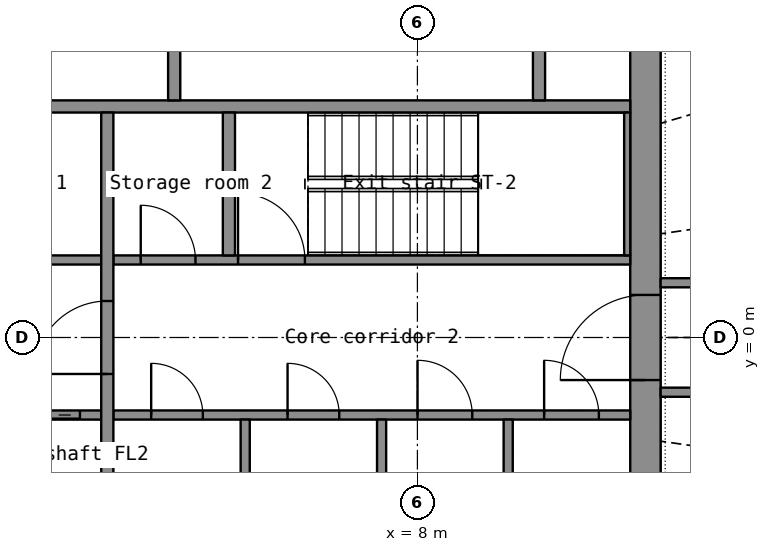
"""IFC4 building model, lengths in metres.
Left out: names, types, materials, properties, quantities, classifications, styles, units other than length and angle.
Written with IfcOpenShell. Run it as: python <this file> out.ifc"""

import sys

from ifc_helpers import new_model, si_unit, direction, frame, frame_2d, origin, place, context, subcontext, project, spatial, rectangle, extrude, element, fill, save


model = new_model("IFC4")
c1 = context("Model", 3, precision=1e-05, world=origin(), true_north=direction((0.0, 1.0)))
c2 = subcontext(c1, "Body", "Model", "MODEL_VIEW")
j1 = project(units=[si_unit("LENGTHUNIT", "METRE"), si_unit("PLANEANGLEUNIT", "RADIAN")], contexts=[c1])
p1 = place(None, origin())
s1 = spatial("IfcSite", under=j1, at=p1, CompositionType="ELEMENT")
p2 = place(p1, origin())
s2 = spatial("IfcBuilding", under=s1, at=p2, CompositionType="ELEMENT")
p3 = place(p2, frame((0.0, 0.0, 123.0)))
s3 = spatial("IfcBuildingStorey", under=s2, at=p3, CompositionType="ELEMENT", Elevation=123.0)
p4 = place(p3, frame((11.75, -7.2, 0.0), z_axis=(0.0, 0.0, 1.0), x_axis=(0.0, 1.0, 0.0)))
e1 = element("IfcWall", 1, at=p4, inside=s3, PredefinedType="SHEAR", context=c2, shape_type="SweptSolid", body=[
    extrude(rectangle(XDim=14.4, YDim=0.5, at=frame_2d((7.2, 0.0))), origin(), (0.0, 0.0, 1.0), 3.3),
])
p5 = place(p4, frame((6.5, 0.0, 0.0)))
e2 = element("IfcOpeningElement", 2, at=p5, cuts=e1, PredefinedType="OPENING", context=c2, shape_type="SweptSolid", body=[
    extrude(rectangle(XDim=1.4, YDim=2.2, at=frame_2d((0.7, 1.1))), frame((0.0, 0.26, 0.0), z_axis=(0.0, -1.0, 0.0), x_axis=(1.0, 0.0, 0.0)), (0.0, 0.0, 1.0), 0.52),
])
p6 = place(p3, frame((-11.5, 3.8, 0.0), z_axis=(0.0, 0.0, 1.0), x_axis=(1.0, 0.0, 0.0)))
e3 = element("IfcWall", 3, at=p6, inside=s3, PredefinedType="SHEAR", context=c2, shape_type="SweptSolid", body=[
    extrude(rectangle(XDim=23.0, YDim=0.2, at=frame_2d((11.5, 0.0))), origin(), (0.0, 0.0, 1.0), 3.3),
])
p7 = place(p3, frame((10.0, 3.9, 0.0), z_axis=(0.0, 0.0, 1.0), x_axis=(0.0, 1.0, 0.0)))
e4 = element("IfcWall", 4, at=p7, inside=s3, PredefinedType="SHEAR", context=c2, shape_type="SweptSolid", body=[
    extrude(rectangle(XDim=2.8, YDim=0.2, at=frame_2d((1.4, 0.0))), origin(), (0.0, 0.0, 1.0), 3.3),
])
p8 = place(p3, frame((4.0, 3.9, 0.0), z_axis=(0.0, 0.0, 1.0), x_axis=(0.0, 1.0, 0.0)))
e5 = element("IfcWall", 5, at=p8, inside=s3, PredefinedType="PARTITIONING", context=c2, shape_type="SweptSolid", body=[
    extrude(rectangle(XDim=2.8, YDim=0.2, at=frame_2d((1.4, 0.0))), origin(), (0.0, 0.0, 1.0), 3.3),
])
p9 = place(p3, frame((-2.8, -1.275, 0.0), z_axis=(0.0, 0.0, 1.0), x_axis=(1.0, 0.0, 0.0)))
e6 = element("IfcWall", 6, at=p9, inside=s3, PredefinedType="SHEAR", context=c2, shape_type="SweptSolid", body=[
    extrude(rectangle(XDim=5.6, YDim=0.15, at=frame_2d((2.8, 0.0))), origin(), (0.0, 0.0, 1.0), 3.3),
])
p10 = place(p9, frame((4.15, 0.0, 0.0)))
e7 = element("IfcOpeningElement", 7, at=p10, cuts=e6, PredefinedType="OPENING", context=c2, shape_type="SweptSolid", body=[
    extrude(rectangle(XDim=1.1, YDim=2.2, at=frame_2d((0.55, 1.1))), frame((0.0, 0.085, 0.0), z_axis=(0.0, -1.0, 0.0), x_axis=(1.0, 0.0, 0.0)), (0.0, 0.0, 1.0), 0.17),
])
p11 = place(p9, frame((1.35, 0.0, 0.0)))
e8 = element("IfcOpeningElement", 8, at=p11, cuts=e6, PredefinedType="OPENING", context=c2, shape_type="SweptSolid", body=[
    extrude(rectangle(XDim=0.9, YDim=2.1, at=frame_2d((0.45, 1.05))), frame((0.0, 0.085, 0.0), z_axis=(0.0, -1.0, 0.0), x_axis=(1.0, 0.0, 0.0)), (0.0, 0.0, 1.0), 0.17),
])
p12 = place(p3, frame((3.0, -1.275, 0.0), z_axis=(0.0, 0.0, 1.0), x_axis=(1.0, 0.0, 0.0)))
e9 = element("IfcWall", 9, at=p12, inside=s3, PredefinedType="PARTITIONING", context=c2, shape_type="SweptSolid", body=[
    extrude(rectangle(XDim=8.5, YDim=0.15, at=frame_2d((4.25, 0.0))), origin(), (0.0, 0.0, 1.0), 3.3),
])
p13 = place(p12, frame((0.622, 0.0, 0.0)))
e10 = element("IfcOpeningElement", 10, at=p13, cuts=e9, PredefinedType="OPENING", context=c2, shape_type="SweptSolid", body=[
    extrude(rectangle(XDim=0.85, YDim=2.1, at=frame_2d((0.425, 1.05))), frame((0.0, 0.085, 0.0), z_axis=(0.0, -1.0, 0.0), x_axis=(1.0, 0.0, 0.0)), (0.0, 0.0, 1.0), 0.17),
])
p14 = place(p12, frame((2.865, 0.0, 0.0)))
e11 = element("IfcOpeningElement", 11, at=p14, cuts=e9, PredefinedType="OPENING", context=c2, shape_type="SweptSolid", body=[
    extrude(rectangle(XDim=0.85, YDim=2.1, at=frame_2d((0.425, 1.05))), frame((0.0, 0.085, 0.0), z_axis=(0.0, -1.0, 0.0), x_axis=(1.0, 0.0, 0.0)), (0.0, 0.0, 1.0), 0.17),
])
p15 = place(p12, frame((5.002, 0.0, 0.0)))
e12 = element("IfcOpeningElement", 12, at=p15, cuts=e9, PredefinedType="OPENING", context=c2, shape_type="SweptSolid", body=[
    extrude(rectangle(XDim=0.9, YDim=2.1, at=frame_2d((0.45, 1.05))), frame((0.0, 0.085, 0.0), z_axis=(0.0, -1.0, 0.0), x_axis=(1.0, 0.0, 0.0)), (0.0, 0.0, 1.0), 0.17),
])
p16 = place(p12, frame((7.084, 0.0, 0.0)))
e13 = element("IfcOpeningElement", 13, at=p16, cuts=e9, PredefinedType="OPENING", context=c2, shape_type="SweptSolid", body=[
    extrude(rectangle(XDim=0.9, YDim=2.1, at=frame_2d((0.45, 1.05))), frame((0.0, 0.085, 0.0), z_axis=(0.0, -1.0, 0.0), x_axis=(1.0, 0.0, 0.0)), (0.0, 0.0, 1.0), 0.17),
])
p17 = place(p3, frame((-2.8, 1.275, 0.0), z_axis=(0.0, 0.0, 1.0), x_axis=(1.0, 0.0, 0.0)))
e14 = element("IfcWall", 14, at=p17, inside=s3, PredefinedType="SHEAR", context=c2, shape_type="SweptSolid", body=[
    extrude(rectangle(XDim=5.6, YDim=0.15, at=frame_2d((2.8, 0.0))), origin(), (0.0, 0.0, 1.0), 3.3),
])
p18 = place(p17, frame((0.35, 0.0, 0.0)))
e15 = element("IfcOpeningElement", 15, at=p18, cuts=e14, PredefinedType="OPENING", context=c2, shape_type="SweptSolid", body=[
    extrude(rectangle(XDim=1.1, YDim=2.2, at=frame_2d((0.55, 1.1))), frame((0.0, 0.085, 0.0), z_axis=(0.0, -1.0, 0.0), x_axis=(1.0, 0.0, 0.0)), (0.0, 0.0, 1.0), 0.17),
])
p19 = place(p17, frame((3.35, 0.0, 0.0)))
e16 = element("IfcOpeningElement", 16, at=p19, cuts=e14, PredefinedType="OPENING", context=c2, shape_type="SweptSolid", body=[
    extrude(rectangle(XDim=0.9, YDim=2.1, at=frame_2d((0.45, 1.05))), frame((0.0, 0.085, 0.0), z_axis=(0.0, -1.0, 0.0), x_axis=(1.0, 0.0, 0.0)), (0.0, 0.0, 1.0), 0.17),
])
p20 = place(p3, frame((3.0, 1.275, 0.0), z_axis=(0.0, 0.0, 1.0), x_axis=(1.0, 0.0, 0.0)))
e17 = element("IfcWall", 17, at=p20, inside=s3, PredefinedType="SHEAR", context=c2, shape_type="SweptSolid", body=[
    extrude(rectangle(XDim=8.5, YDim=0.15, at=frame_2d((4.25, 0.0))), origin(), (0.0, 0.0, 1.0), 3.3),
])
p21 = place(p20, frame((2.05, 0.0, 0.0)))
e18 = element("IfcOpeningElement", 18, at=p21, cuts=e17, PredefinedType="OPENING", context=c2, shape_type="SweptSolid", body=[
    extrude(rectangle(XDim=1.1, YDim=2.15, at=frame_2d((0.55, 1.075))), frame((0.0, 0.085, 0.0), z_axis=(0.0, -1.0, 0.0), x_axis=(1.0, 0.0, 0.0)), (0.0, 0.0, 1.0), 0.17),
])
p22 = place(p20, frame((0.45, 0.0, 0.0)))
e19 = element("IfcOpeningElement", 19, at=p22, cuts=e17, PredefinedType="OPENING", context=c2, shape_type="SweptSolid", body=[
    extrude(rectangle(XDim=0.9, YDim=2.1, at=frame_2d((0.45, 1.05))), frame((0.0, 0.085, 0.0), z_axis=(0.0, -1.0, 0.0), x_axis=(1.0, 0.0, 0.0)), (0.0, 0.0, 1.0), 0.17),
])
p23 = place(p3, frame((2.9, -3.7, 0.0), z_axis=(0.0, 0.0, 1.0), x_axis=(0.0, 1.0, 0.0)))
e20 = element("IfcWall", 20, at=p23, inside=s3, PredefinedType="SHEAR", context=c2, shape_type="SweptSolid", body=[
    extrude(rectangle(XDim=7.4, YDim=0.2, at=frame_2d((3.7, 0.0))), origin(), (0.0, 0.0, 1.0), 3.3),
])
p24 = place(p23, frame((3.1, 0.0, 0.0)))
e21 = element("IfcOpeningElement", 21, at=p24, cuts=e20, PredefinedType="OPENING", context=c2, shape_type="SweptSolid", body=[
    extrude(rectangle(XDim=1.2, YDim=2.2, at=frame_2d((0.6, 1.1))), frame((0.0, 0.11, 0.0), z_axis=(0.0, -1.0, 0.0), x_axis=(1.0, 0.0, 0.0)), (0.0, 0.0, 1.0), 0.22),
])
p25 = place(p3, frame((11.45, 1.35, 0.0), z_axis=(0.0, 0.0, 1.0), x_axis=(0.0, 1.0, 0.0)))
e22 = element("IfcWall", 22, at=p25, inside=s3, PredefinedType="SHEAR", context=c2, shape_type="SweptSolid", body=[
    extrude(rectangle(XDim=2.35, YDim=0.1, at=frame_2d((1.175, 0.0))), origin(), (0.0, 0.0, 1.0), 3.3),
])
p26 = place(p3, frame((4.9, 1.35, 0.0), z_axis=(0.0, 0.0, 1.0), x_axis=(0.0, 1.0, 0.0)))
e23 = element("IfcWall", 23, at=p26, inside=s3, PredefinedType="SHEAR", context=c2, shape_type="SweptSolid", body=[
    extrude(rectangle(XDim=2.35, YDim=0.2, at=frame_2d((1.175, 0.0))), origin(), (0.0, 0.0, 1.0), 3.3),
])
for number, where, z_axis, x_axis in (
    (24, (5.168, -3.7, 0.0), (0.0, 0.0, 1.0), (0.0, 1.0, 0.0)),
    (25, (7.411, -3.7, 0.0), (0.0, 0.0, 1.0), (0.0, 1.0, 0.0)),
    (26, (9.493, -3.7, 0.0), (0.0, 0.0, 1.0), (0.0, 1.0, 0.0)),
):
    element("IfcWall", number, at=place(p3, frame(where, z_axis=z_axis, x_axis=x_axis)), inside=s3, PredefinedType="PARTITIONING", context=c2, shape_type="SweptSolid", body=[
        extrude(rectangle(XDim=2.35, YDim=0.15, at=frame_2d((1.175, 0.0))), origin(), (0.0, 0.0, 1.0), 3.3),
    ])
p27 = place(p3, frame((15.923, 0.9, 0.0), z_axis=(0.0, 0.0, 1.0), x_axis=(-1.0, 0.0, 0.0)))
e27 = element("IfcWall", 27, at=p27, inside=s3, PredefinedType="PARTITIONING", context=c2, shape_type="SweptSolid", body=[
    extrude(rectangle(XDim=3.923, YDim=0.15, at=frame_2d((1.961, 0.0))), origin(), (0.0, 0.0, 1.0), 2.4),
])
p28 = place(p3, frame((12.0, -0.9, 0.0), z_axis=(0.0, 0.0, 1.0), x_axis=(1.0, 0.0, 0.0)))
e28 = element("IfcWall", 28, at=p28, inside=s3, PredefinedType="PARTITIONING", context=c2, shape_type="SweptSolid", body=[
    extrude(rectangle(XDim=0.559, YDim=0.15, at=frame_2d((0.28, 0.0))), origin(), (0.0, 0.0, 1.0), 2.4),
])
p29 = place(p5, origin())
e29 = element("IfcDoor", 29, at=p29, inside=s3, OperationType="DOUBLE_DOOR_SINGLE_SWING", PredefinedType="DOOR", context=c2, shape_type="SweptSolid", body=[
    extrude(rectangle(XDim=1.4, YDim=2.2, at=frame_2d((0.7, 1.1))), frame((0.0, 0.025, 0.0), z_axis=(0.0, -1.0, 0.0), x_axis=(1.0, 0.0, 0.0)), (0.0, 0.0, 1.0), 0.05),
])
fill(e2, e29)
p30 = place(p24, origin())
e30 = element("IfcDoor", 30, at=p30, inside=s3, OperationType="SINGLE_SWING_LEFT", PredefinedType="DOOR", context=c2, shape_type="SweptSolid", body=[
    extrude(rectangle(XDim=1.2, YDim=2.2, at=frame_2d((0.6, 1.1))), frame((0.0, 0.025, 0.0), z_axis=(0.0, -1.0, 0.0), x_axis=(1.0, 0.0, 0.0)), (0.0, 0.0, 1.0), 0.05),
])
fill(e21, e30)
p31 = place(p10, origin())
e31 = element("IfcDoor", 31, at=p31, inside=s3, OperationType="DOUBLE_DOOR_SLIDING", PredefinedType="DOOR", context=c2, shape_type="SweptSolid", body=[
    extrude(rectangle(XDim=1.1, YDim=2.2, at=frame_2d((0.55, 1.1))), frame((0.0, 0.025, 0.0), z_axis=(0.0, -1.0, 0.0), x_axis=(1.0, 0.0, 0.0)), (0.0, 0.0, 1.0), 0.05),
])
fill(e7, e31)
p32 = place(p21, origin())
e32 = element("IfcDoor", 32, at=p32, inside=s3, OperationType="SINGLE_SWING_LEFT", PredefinedType="DOOR", context=c2, shape_type="SweptSolid", body=[
    extrude(rectangle(XDim=1.1, YDim=2.15, at=frame_2d((0.55, 1.075))), frame((0.0, 0.025, 0.0), z_axis=(0.0, -1.0, 0.0), x_axis=(1.0, 0.0, 0.0)), (0.0, 0.0, 1.0), 0.05),
])
fill(e18, e32)
p33 = place(p13, origin())
e33 = element("IfcDoor", 33, at=p33, inside=s3, OperationType="SINGLE_SWING_LEFT", PredefinedType="DOOR", context=c2, shape_type="SweptSolid", body=[
    extrude(rectangle(XDim=0.85, YDim=2.1, at=frame_2d((0.425, 1.05))), frame((0.0, 0.025, 0.0), z_axis=(0.0, -1.0, 0.0), x_axis=(1.0, 0.0, 0.0)), (0.0, 0.0, 1.0), 0.05),
])
fill(e10, e33)
p34 = place(p14, origin())
e34 = element("IfcDoor", 34, at=p34, inside=s3, OperationType="SINGLE_SWING_LEFT", PredefinedType="DOOR", context=c2, shape_type="SweptSolid", body=[
    extrude(rectangle(XDim=0.85, YDim=2.1, at=frame_2d((0.425, 1.05))), frame((0.0, 0.025, 0.0), z_axis=(0.0, -1.0, 0.0), x_axis=(1.0, 0.0, 0.0)), (0.0, 0.0, 1.0), 0.05),
])
fill(e11, e34)
p35 = place(p15, origin())
e35 = element("IfcDoor", 35, at=p35, inside=s3, OperationType="SINGLE_SWING_LEFT", PredefinedType="DOOR", context=c2, shape_type="SweptSolid", body=[
    extrude(rectangle(XDim=0.9, YDim=2.1, at=frame_2d((0.45, 1.05))), frame((0.0, 0.025, 0.0), z_axis=(0.0, -1.0, 0.0), x_axis=(1.0, 0.0, 0.0)), (0.0, 0.0, 1.0), 0.05),
])
fill(e12, e35)
p36 = place(p16, origin())
e36 = element("IfcDoor", 36, at=p36, inside=s3, OperationType="SINGLE_SWING_LEFT", PredefinedType="DOOR", context=c2, shape_type="SweptSolid", body=[
    extrude(rectangle(XDim=0.9, YDim=2.1, at=frame_2d((0.45, 1.05))), frame((0.0, 0.025, 0.0), z_axis=(0.0, -1.0, 0.0), x_axis=(1.0, 0.0, 0.0)), (0.0, 0.0, 1.0), 0.05),
])
fill(e13, e36)
p37 = place(p22, origin())
e37 = element("IfcDoor", 37, at=p37, inside=s3, OperationType="SINGLE_SWING_LEFT", PredefinedType="DOOR", context=c2, shape_type="SweptSolid", body=[
    extrude(rectangle(XDim=0.9, YDim=2.1, at=frame_2d((0.45, 1.05))), frame((0.0, 0.025, 0.0), z_axis=(0.0, -1.0, 0.0), x_axis=(1.0, 0.0, 0.0)), (0.0, 0.0, 1.0), 0.05),
])
fill(e19, e37)
save(model, sys.argv[1])
